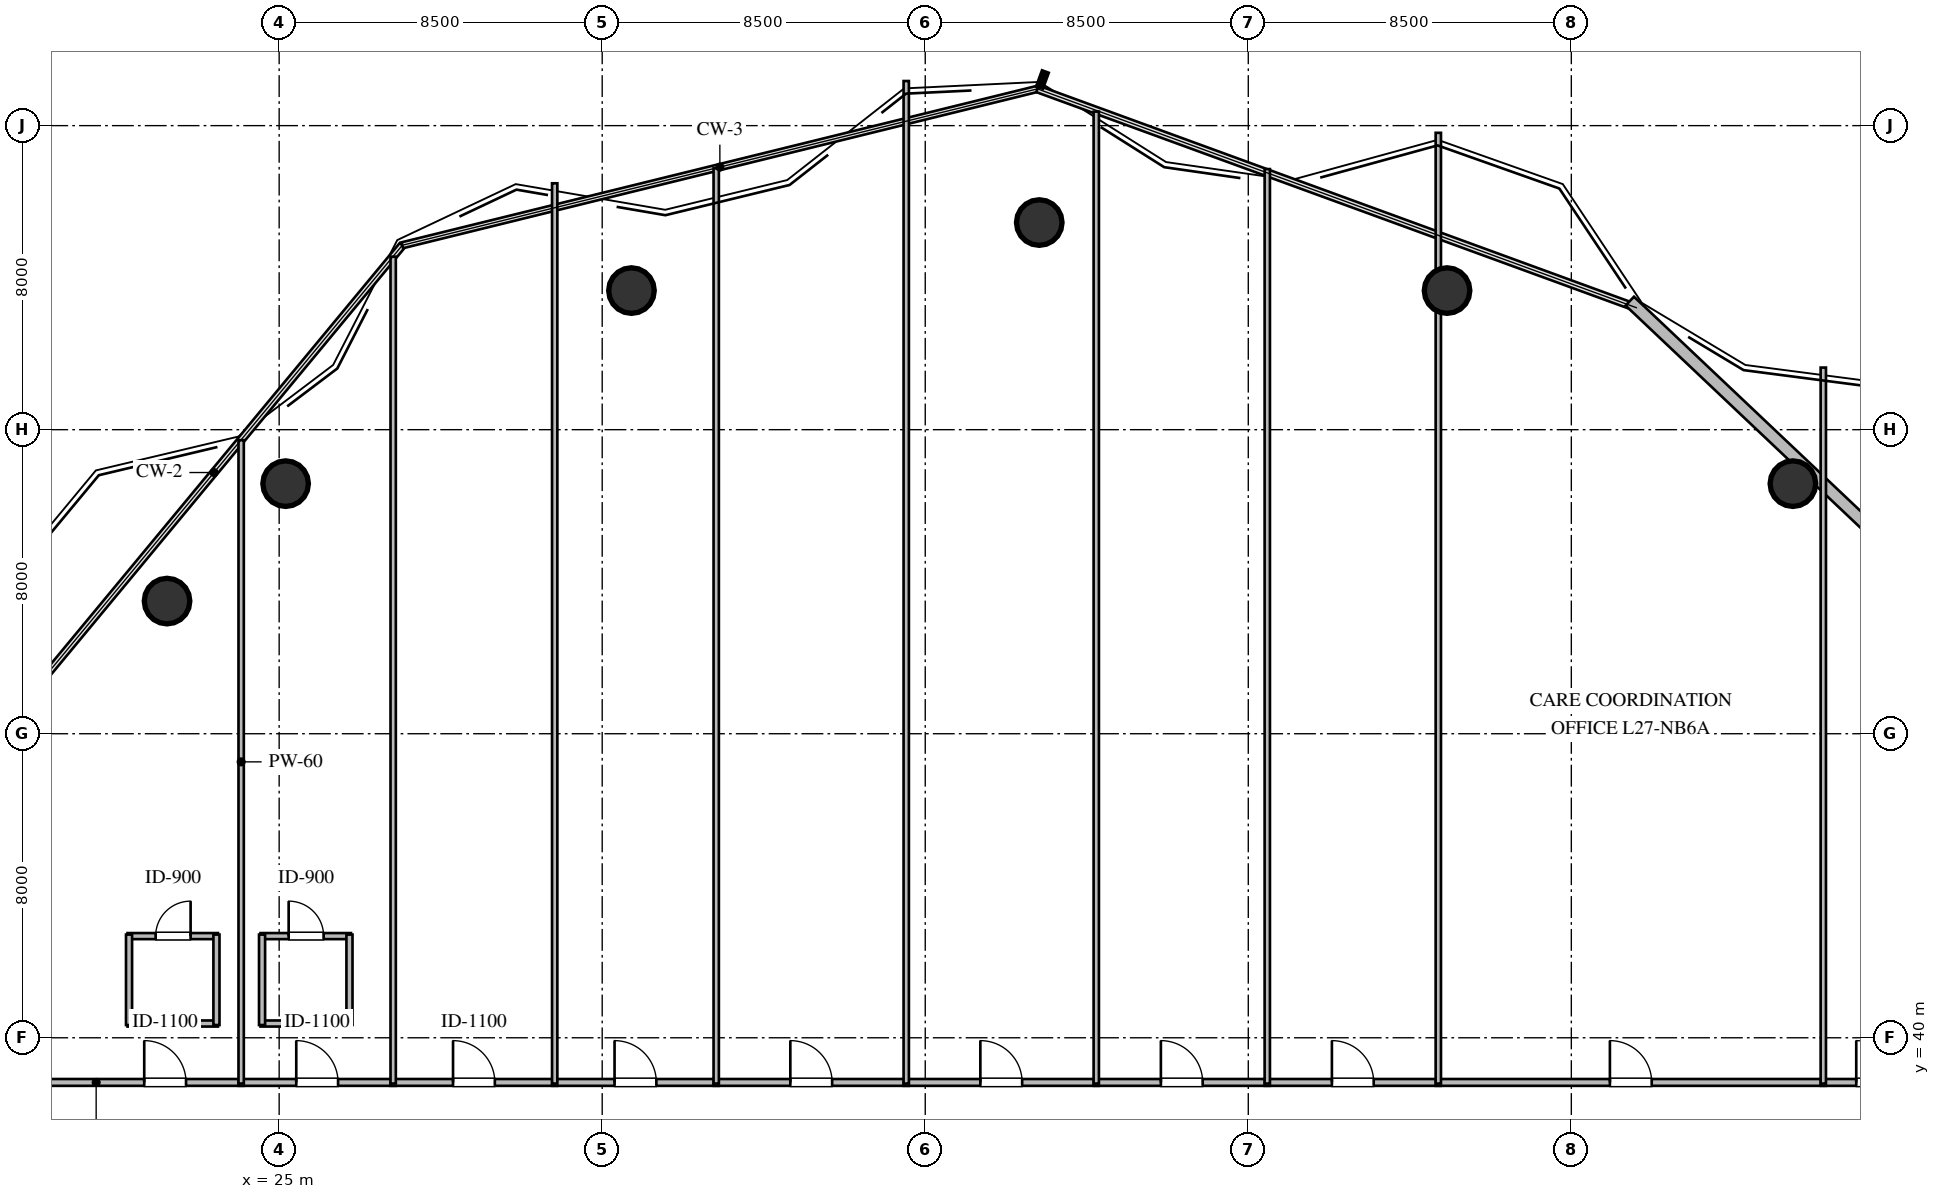
"""IFC4 building model, lengths in metres.
Left out: names, types, materials, properties, quantities, classifications, styles, units other than length and angle.
Written with IfcOpenShell. Run it as: python <this file> out.ifc"""

import sys

from ifc_helpers import new_model, si_unit, direction, frame, frame_2d, origin, origin_2d, place, context, subcontext, project, spatial, rectangle, circle, extrude, element, fill, save


model = new_model("IFC4")
c1 = context("Model", 3, precision=1e-05, world=origin(), true_north=direction((0.0, 1.0)))
c2 = subcontext(c1, "Body", "Model", "MODEL_VIEW")
j1 = project(units=[si_unit("LENGTHUNIT", "METRE"), si_unit("PLANEANGLEUNIT", "RADIAN")], contexts=[c1])
p1 = place(None, origin())
s1 = spatial("IfcSite", under=j1, at=p1, CompositionType="ELEMENT")
p2 = place(p1, origin())
s2 = spatial("IfcBuilding", under=s1, at=p2, CompositionType="ELEMENT")
p3 = place(p2, frame((0.0, 0.0, 106.2)))
s3 = spatial("IfcBuildingStorey", under=s2, at=p3, CompositionType="ELEMENT", Elevation=106.2)
for number, where, z_axis, x_axis in (
    (1, (64.83, 54.58, 0.0), (0.0, 0.0, 1.0), (1.0, 0.0, 0.0)),
    (2, (55.73, 59.66, 0.0), (0.0, 0.0, 1.0), (1.0, 0.0, 0.0)),
    (3, (45.0, 61.45, 0.0), (0.0, 0.0, 1.0), (1.0, 0.0, 0.0)),
    (4, (34.27, 59.66, 0.0), (0.0, 0.0, 1.0), (1.0, 0.0, 0.0)),
    (5, (25.17, 54.58, 0.0), (0.0, 0.0, 1.0), (1.0, 0.0, 0.0)),
    (6, (22.05, 51.49, 0.0), (0.0, 0.0, 1.0), (1.0, 0.0, 0.0)),
):
    element("IfcColumn", number, at=place(p3, frame(where, z_axis=z_axis, x_axis=x_axis)), inside=s3, PredefinedType="COLUMN", context=c2, shape_type="SweptSolid", body=[
        extrude(circle(Radius=0.6, at=origin_2d()), origin(), (0.0, 0.0, 1.0), 3.6),
    ])
p4 = place(p3, frame((60.538, 59.383, 0.0), z_axis=(0.0, 0.0, 1.0), x_axis=(0.726378346584, -0.687295058628, 0.0)))
e7 = element("IfcWall", 7, at=p4, inside=s3, PredefinedType="STANDARD", context=c2, shape_type="SweptSolid", body=[
    extrude(rectangle(XDim=15.654, YDim=0.32, at=frame_2d((7.827, 0.0))), origin(), (0.0, 0.0, 1.0), 3.36),
])
p5 = place(p3, frame((21.01, 40.375, 0.0), z_axis=(0.0, 0.0, 1.0), x_axis=(1.0, 0.0, 0.0)))
e8 = element("IfcWall", 8, at=p5, inside=s3, PredefinedType="PLUMBINGWALL", context=c2, shape_type="SweptSolid", body=[
    extrude(rectangle(XDim=2.38, YDim=0.16, at=frame_2d((1.19, 0.0))), origin(), (0.0, 0.0, 1.0), 3.36),
])
p6 = place(p3, frame((21.01, 42.675, 0.0), z_axis=(0.0, 0.0, 1.0), x_axis=(1.0, 0.0, 0.0)))
e9 = element("IfcWall", 9, at=p6, inside=s3, PredefinedType="PLUMBINGWALL", context=c2, shape_type="SweptSolid", body=[
    extrude(rectangle(XDim=2.38, YDim=0.16, at=frame_2d((1.19, 0.0))), origin(), (0.0, 0.0, 1.0), 3.36),
])
p7 = place(p6, frame((0.74, 0.0, 0.0)))
e10 = element("IfcOpeningElement", 10, at=p7, cuts=e9, PredefinedType="OPENING", context=c2, shape_type="SweptSolid", body=[
    extrude(rectangle(XDim=0.92, YDim=2.1, at=frame_2d((0.46, 1.05))), frame((0.0, 0.09, 0.0), z_axis=(0.0, -1.0, 0.0), x_axis=(1.0, 0.0, 0.0)), (0.0, 0.0, 1.0), 0.18),
])
p8 = place(p3, frame((21.05, 40.335, 0.0), z_axis=(0.0, 0.0, 1.0), x_axis=(0.0, 1.0, 0.0)))
e11 = element("IfcWall", 11, at=p8, inside=s3, PredefinedType="PLUMBINGWALL", context=c2, shape_type="SweptSolid", body=[
    extrude(rectangle(XDim=2.38, YDim=0.16, at=frame_2d((1.19, 0.0))), origin(), (0.0, 0.0, 1.0), 3.36),
])
p9 = place(p3, frame((23.35, 40.335, 0.0), z_axis=(0.0, 0.0, 1.0), x_axis=(0.0, 1.0, 0.0)))
e12 = element("IfcWall", 12, at=p9, inside=s3, PredefinedType="PLUMBINGWALL", context=c2, shape_type="SweptSolid", body=[
    extrude(rectangle(XDim=2.38, YDim=0.16, at=frame_2d((1.19, 0.0))), origin(), (0.0, 0.0, 1.0), 2.89),
])
p10 = place(p3, frame((24.51, 40.375, 0.0), z_axis=(0.0, 0.0, 1.0), x_axis=(1.0, 0.0, 0.0)))
e13 = element("IfcWall", 13, at=p10, inside=s3, PredefinedType="PLUMBINGWALL", context=c2, shape_type="SweptSolid", body=[
    extrude(rectangle(XDim=2.38, YDim=0.16, at=frame_2d((1.19, 0.0))), origin(), (0.0, 0.0, 1.0), 3.36),
])
p11 = place(p3, frame((24.51, 42.675, 0.0), z_axis=(0.0, 0.0, 1.0), x_axis=(1.0, 0.0, 0.0)))
e14 = element("IfcWall", 14, at=p11, inside=s3, PredefinedType="PLUMBINGWALL", context=c2, shape_type="SweptSolid", body=[
    extrude(rectangle(XDim=2.38, YDim=0.16, at=frame_2d((1.19, 0.0))), origin(), (0.0, 0.0, 1.0), 3.36),
])
p12 = place(p11, frame((0.74, 0.0, 0.0)))
e15 = element("IfcOpeningElement", 15, at=p12, cuts=e14, PredefinedType="OPENING", context=c2, shape_type="SweptSolid", body=[
    extrude(rectangle(XDim=0.92, YDim=2.1, at=frame_2d((0.46, 1.05))), frame((0.0, 0.09, 0.0), z_axis=(0.0, -1.0, 0.0), x_axis=(1.0, 0.0, 0.0)), (0.0, 0.0, 1.0), 0.18),
])
for number, where, z_axis, x_axis in (
    (16, (24.55, 40.335, 0.0), (0.0, 0.0, 1.0), (0.0, 1.0, 0.0)),
    (17, (26.85, 40.335, 0.0), (0.0, 0.0, 1.0), (0.0, 1.0, 0.0)),
):
    element("IfcWall", number, at=place(p3, frame(where, z_axis=z_axis, x_axis=x_axis)), inside=s3, PredefinedType="PLUMBINGWALL", context=c2, shape_type="SweptSolid", body=[
        extrude(rectangle(XDim=2.38, YDim=0.16, at=frame_2d((1.19, 0.0))), origin(), (0.0, 0.0, 1.0), 3.36),
    ])
p13 = place(p3, frame((16.305, 38.825, 0.0), z_axis=(0.0, 0.0, 1.0), x_axis=(1.0, 0.0, 0.0)))
e18 = element("IfcWall", 18, at=p13, inside=s3, PredefinedType="PARTITIONING", context=c2, shape_type="SweptSolid", body=[
    extrude(rectangle(XDim=7.76, YDim=0.18, at=frame_2d((3.88, 0.0))), origin(), (0.0, 0.0, 1.0), 3.36),
])
p14 = place(p13, frame((5.145, 0.0, 0.0)))
e19 = element("IfcOpeningElement", 19, at=p14, cuts=e18, PredefinedType="OPENING", context=c2, shape_type="SweptSolid", body=[
    extrude(rectangle(XDim=1.1, YDim=2.1, at=frame_2d((0.55, 1.05))), frame((0.0, 0.1, 0.0), z_axis=(0.0, -1.0, 0.0), x_axis=(1.0, 0.0, 0.0)), (0.0, 0.0, 1.0), 0.2),
])
p15 = place(p3, frame((23.935, 38.825, 0.0), z_axis=(0.0, 0.0, 1.0), x_axis=(1.0, 0.0, 0.0)))
e20 = element("IfcWall", 20, at=p15, inside=s3, PredefinedType="PARTITIONING", context=c2, shape_type="SweptSolid", body=[
    extrude(rectangle(XDim=4.13, YDim=0.18, at=frame_2d((2.065, 0.0))), origin(), (0.0, 0.0, 1.0), 3.36),
])
p16 = place(p15, frame((1.515, 0.0, 0.0)))
e21 = element("IfcOpeningElement", 21, at=p16, cuts=e20, PredefinedType="OPENING", context=c2, shape_type="SweptSolid", body=[
    extrude(rectangle(XDim=1.1, YDim=2.1, at=frame_2d((0.55, 1.05))), frame((0.0, 0.1, 0.0), z_axis=(0.0, -1.0, 0.0), x_axis=(1.0, 0.0, 0.0)), (0.0, 0.0, 1.0), 0.2),
])
p17 = place(p3, frame((27.935, 38.825, 0.0), z_axis=(0.0, 0.0, 1.0), x_axis=(1.0, 0.0, 0.0)))
e22 = element("IfcWall", 22, at=p17, inside=s3, PredefinedType="PARTITIONING", context=c2, shape_type="SweptSolid", body=[
    extrude(rectangle(XDim=4.38, YDim=0.18, at=frame_2d((2.19, 0.0))), origin(), (0.0, 0.0, 1.0), 3.36),
])
p18 = place(p17, frame((1.64, 0.0, 0.0)))
e23 = element("IfcOpeningElement", 23, at=p18, cuts=e22, PredefinedType="OPENING", context=c2, shape_type="SweptSolid", body=[
    extrude(rectangle(XDim=1.1, YDim=2.1, at=frame_2d((0.55, 1.05))), frame((0.0, 0.1, 0.0), z_axis=(0.0, -1.0, 0.0), x_axis=(1.0, 0.0, 0.0)), (0.0, 0.0, 1.0), 0.2),
])
p19 = place(p3, frame((32.185, 38.825, 0.0), z_axis=(0.0, 0.0, 1.0), x_axis=(1.0, 0.0, 0.0)))
e24 = element("IfcWall", 24, at=p19, inside=s3, PredefinedType="PARTITIONING", context=c2, shape_type="SweptSolid", body=[
    extrude(rectangle(XDim=4.38, YDim=0.18, at=frame_2d((2.19, 0.0))), origin(), (0.0, 0.0, 1.0), 3.36),
])
p20 = place(p19, frame((1.64, 0.0, 0.0)))
e25 = element("IfcOpeningElement", 25, at=p20, cuts=e24, PredefinedType="OPENING", context=c2, shape_type="SweptSolid", body=[
    extrude(rectangle(XDim=1.1, YDim=2.1, at=frame_2d((0.55, 1.05))), frame((0.0, 0.1, 0.0), z_axis=(0.0, -1.0, 0.0), x_axis=(1.0, 0.0, 0.0)), (0.0, 0.0, 1.0), 0.2),
])
p21 = place(p3, frame((36.435, 38.825, 0.0), z_axis=(0.0, 0.0, 1.0), x_axis=(1.0, 0.0, 0.0)))
e26 = element("IfcWall", 26, at=p21, inside=s3, PredefinedType="PARTITIONING", context=c2, shape_type="SweptSolid", body=[
    extrude(rectangle(XDim=5.13, YDim=0.18, at=frame_2d((2.565, 0.0))), origin(), (0.0, 0.0, 1.0), 3.36),
])
p22 = place(p21, frame((2.015, 0.0, 0.0)))
e27 = element("IfcOpeningElement", 27, at=p22, cuts=e26, PredefinedType="OPENING", context=c2, shape_type="SweptSolid", body=[
    extrude(rectangle(XDim=1.1, YDim=2.1, at=frame_2d((0.55, 1.05))), frame((0.0, 0.1, 0.0), z_axis=(0.0, -1.0, 0.0), x_axis=(1.0, 0.0, 0.0)), (0.0, 0.0, 1.0), 0.2),
])
p23 = place(p3, frame((41.435, 38.825, 0.0), z_axis=(0.0, 0.0, 1.0), x_axis=(1.0, 0.0, 0.0)))
e28 = element("IfcWall", 28, at=p23, inside=s3, PredefinedType="PARTITIONING", context=c2, shape_type="SweptSolid", body=[
    extrude(rectangle(XDim=5.13, YDim=0.18, at=frame_2d((2.565, 0.0))), origin(), (0.0, 0.0, 1.0), 3.36),
])
p24 = place(p23, frame((2.015, 0.0, 0.0)))
e29 = element("IfcOpeningElement", 29, at=p24, cuts=e28, PredefinedType="OPENING", context=c2, shape_type="SweptSolid", body=[
    extrude(rectangle(XDim=1.1, YDim=2.1, at=frame_2d((0.55, 1.05))), frame((0.0, 0.1, 0.0), z_axis=(0.0, -1.0, 0.0), x_axis=(1.0, 0.0, 0.0)), (0.0, 0.0, 1.0), 0.2),
])
p25 = place(p3, frame((46.435, 38.825, 0.0), z_axis=(0.0, 0.0, 1.0), x_axis=(1.0, 0.0, 0.0)))
e30 = element("IfcWall", 30, at=p25, inside=s3, PredefinedType="PARTITIONING", context=c2, shape_type="SweptSolid", body=[
    extrude(rectangle(XDim=4.63, YDim=0.18, at=frame_2d((2.315, 0.0))), origin(), (0.0, 0.0, 1.0), 3.36),
])
p26 = place(p25, frame((1.765, 0.0, 0.0)))
e31 = element("IfcOpeningElement", 31, at=p26, cuts=e30, PredefinedType="OPENING", context=c2, shape_type="SweptSolid", body=[
    extrude(rectangle(XDim=1.1, YDim=2.1, at=frame_2d((0.55, 1.05))), frame((0.0, 0.1, 0.0), z_axis=(0.0, -1.0, 0.0), x_axis=(1.0, 0.0, 0.0)), (0.0, 0.0, 1.0), 0.2),
])
p27 = place(p3, frame((50.935, 38.825, 0.0), z_axis=(0.0, 0.0, 1.0), x_axis=(1.0, 0.0, 0.0)))
e32 = element("IfcWall", 32, at=p27, inside=s3, PredefinedType="PARTITIONING", context=c2, shape_type="SweptSolid", body=[
    extrude(rectangle(XDim=4.63, YDim=0.18, at=frame_2d((2.315, 0.0))), origin(), (0.0, 0.0, 1.0), 3.36),
])
p28 = place(p27, frame((1.765, 0.0, 0.0)))
e33 = element("IfcOpeningElement", 33, at=p28, cuts=e32, PredefinedType="OPENING", context=c2, shape_type="SweptSolid", body=[
    extrude(rectangle(XDim=1.1, YDim=2.1, at=frame_2d((0.55, 1.05))), frame((0.0, 0.1, 0.0), z_axis=(0.0, -1.0, 0.0), x_axis=(1.0, 0.0, 0.0)), (0.0, 0.0, 1.0), 0.2),
])
p29 = place(p3, frame((55.435, 38.825, 0.0), z_axis=(0.0, 0.0, 1.0), x_axis=(1.0, 0.0, 0.0)))
e34 = element("IfcWall", 34, at=p29, inside=s3, PredefinedType="PARTITIONING", context=c2, shape_type="SweptSolid", body=[
    extrude(rectangle(XDim=10.26, YDim=0.18, at=frame_2d((5.13, 0.0))), origin(), (0.0, 0.0, 1.0), 3.36),
])
p30 = place(p29, frame((4.58, 0.0, 0.0)))
e35 = element("IfcOpeningElement", 35, at=p30, cuts=e34, PredefinedType="OPENING", context=c2, shape_type="SweptSolid", body=[
    extrude(rectangle(XDim=1.1, YDim=2.1, at=frame_2d((0.55, 1.05))), frame((0.0, 0.1, 0.0), z_axis=(0.0, -1.0, 0.0), x_axis=(1.0, 0.0, 0.0)), (0.0, 0.0, 1.0), 0.2),
])
p31 = place(p3, frame((65.565, 38.825, 0.0), z_axis=(0.0, 0.0, 1.0), x_axis=(1.0, 0.0, 0.0)))
e36 = element("IfcWall", 36, at=p31, inside=s3, PredefinedType="PARTITIONING", context=c2, shape_type="SweptSolid", body=[
    extrude(rectangle(XDim=2.965, YDim=0.18, at=frame_2d((1.482, 0.0))), origin(), (0.0, 0.0, 1.0), 3.36),
])
p32 = place(p31, frame((0.932, 0.0, 0.0)))
e37 = element("IfcOpeningElement", 37, at=p32, cuts=e36, PredefinedType="OPENING", context=c2, shape_type="SweptSolid", body=[
    extrude(rectangle(XDim=1.1, YDim=2.1, at=frame_2d((0.55, 1.05))), frame((0.0, 0.1, 0.0), z_axis=(0.0, -1.0, 0.0), x_axis=(1.0, 0.0, 0.0)), (0.0, 0.0, 1.0), 0.2),
])
p33 = place(p3, frame((24.0, 55.724, 0.0), z_axis=(0.0, 0.0, 1.0), x_axis=(0.0, -1.0, 0.0)))
e38 = element("IfcWall", 38, at=p33, inside=s3, PredefinedType="PARTITIONING", context=c2, shape_type="SweptSolid", body=[
    extrude(rectangle(XDim=16.929, YDim=0.14, at=frame_2d((8.465, 0.0))), origin(), (0.0, 0.0, 1.0), 2.89),
])
p34 = place(p3, frame((28.0, 60.552, 0.0), z_axis=(0.0, 0.0, 1.0), x_axis=(0.0, -1.0, 0.0)))
e39 = element("IfcWall", 39, at=p34, inside=s3, PredefinedType="PARTITIONING", context=c2, shape_type="SweptSolid", body=[
    extrude(rectangle(XDim=21.757, YDim=0.14, at=frame_2d((10.879, 0.0))), origin(), (0.0, 0.0, 1.0), 3.36),
])
p35 = place(p3, frame((32.25, 62.483, 0.0), z_axis=(0.0, 0.0, 1.0), x_axis=(0.0, -1.0, 0.0)))
e40 = element("IfcWall", 40, at=p35, inside=s3, PredefinedType="PARTITIONING", context=c2, shape_type="SweptSolid", body=[
    extrude(rectangle(XDim=23.688, YDim=0.14, at=frame_2d((11.844, 0.0))), origin(), (0.0, 0.0, 1.0), 3.36),
])
p36 = place(p3, frame((36.5, 62.876, 0.0), z_axis=(0.0, 0.0, 1.0), x_axis=(0.0, -1.0, 0.0)))
e41 = element("IfcWall", 41, at=p36, inside=s3, PredefinedType="PARTITIONING", context=c2, shape_type="SweptSolid", body=[
    extrude(rectangle(XDim=24.081, YDim=0.14, at=frame_2d((12.041, 0.0))), origin(), (0.0, 0.0, 1.0), 3.36),
])
p37 = place(p3, frame((41.5, 65.174, 0.0), z_axis=(0.0, 0.0, 1.0), x_axis=(0.0, -1.0, 0.0)))
e42 = element("IfcWall", 42, at=p37, inside=s3, PredefinedType="PARTITIONING", context=c2, shape_type="SweptSolid", body=[
    extrude(rectangle(XDim=26.379, YDim=0.14, at=frame_2d((13.189, 0.0))), origin(), (0.0, 0.0, 1.0), 3.36),
])
p38 = place(p3, frame((46.5, 64.369, 0.0), z_axis=(0.0, 0.0, 1.0), x_axis=(0.0, -1.0, 0.0)))
e43 = element("IfcWall", 43, at=p38, inside=s3, PredefinedType="PARTITIONING", context=c2, shape_type="SweptSolid", body=[
    extrude(rectangle(XDim=25.574, YDim=0.14, at=frame_2d((12.787, 0.0))), origin(), (0.0, 0.0, 1.0), 3.36),
])
p39 = place(p3, frame((51.0, 62.857, 0.0), z_axis=(0.0, 0.0, 1.0), x_axis=(0.0, -1.0, 0.0)))
e44 = element("IfcWall", 44, at=p39, inside=s3, PredefinedType="PARTITIONING", context=c2, shape_type="SweptSolid", body=[
    extrude(rectangle(XDim=24.062, YDim=0.14, at=frame_2d((12.031, 0.0))), origin(), (0.0, 0.0, 1.0), 3.36),
])
p40 = place(p3, frame((55.5, 63.811, 0.0), z_axis=(0.0, 0.0, 1.0), x_axis=(0.0, -1.0, 0.0)))
e45 = element("IfcWall", 45, at=p40, inside=s3, PredefinedType="PARTITIONING", context=c2, shape_type="SweptSolid", body=[
    extrude(rectangle(XDim=25.016, YDim=0.14, at=frame_2d((12.508, 0.0))), origin(), (0.0, 0.0, 1.0), 3.36),
])
p41 = place(p3, frame((65.63, 57.634, 0.0), z_axis=(0.0, 0.0, 1.0), x_axis=(0.0, -1.0, 0.0)))
e46 = element("IfcWall", 46, at=p41, inside=s3, PredefinedType="PARTITIONING", context=c2, shape_type="SweptSolid", body=[
    extrude(rectangle(XDim=18.839, YDim=0.14, at=frame_2d((9.419, 0.0))), origin(), (0.0, 0.0, 1.0), 3.36),
])
p42 = place(p7, origin())
e47 = element("IfcDoor", 47, at=p42, inside=s3, OperationType="SINGLE_SWING_RIGHT", PredefinedType="DOOR", context=c2, shape_type="SweptSolid", body=[
    extrude(rectangle(XDim=0.92, YDim=2.1, at=frame_2d((0.46, 1.05))), frame((0.0, 0.025, 0.0), z_axis=(0.0, -1.0, 0.0), x_axis=(1.0, 0.0, 0.0)), (0.0, 0.0, 1.0), 0.05),
])
fill(e10, e47)
p43 = place(p12, origin())
e48 = element("IfcDoor", 48, at=p43, inside=s3, OperationType="SINGLE_SWING_LEFT", PredefinedType="DOOR", context=c2, shape_type="SweptSolid", body=[
    extrude(rectangle(XDim=0.92, YDim=2.1, at=frame_2d((0.46, 1.05))), frame((0.0, 0.025, 0.0), z_axis=(0.0, -1.0, 0.0), x_axis=(1.0, 0.0, 0.0)), (0.0, 0.0, 1.0), 0.05),
])
fill(e15, e48)
p44 = place(p14, origin())
e49 = element("IfcDoor", 49, at=p44, inside=s3, OperationType="SINGLE_SWING_LEFT", PredefinedType="DOOR", context=c2, shape_type="SweptSolid", body=[
    extrude(rectangle(XDim=1.1, YDim=2.1, at=frame_2d((0.55, 1.05))), frame((0.0, 0.025, 0.0), z_axis=(0.0, -1.0, 0.0), x_axis=(1.0, 0.0, 0.0)), (0.0, 0.0, 1.0), 0.05),
])
fill(e19, e49)
p45 = place(p16, origin())
e50 = element("IfcDoor", 50, at=p45, inside=s3, OperationType="SINGLE_SWING_LEFT", PredefinedType="DOOR", context=c2, shape_type="SweptSolid", body=[
    extrude(rectangle(XDim=1.1, YDim=2.1, at=frame_2d((0.55, 1.05))), frame((0.0, 0.025, 0.0), z_axis=(0.0, -1.0, 0.0), x_axis=(1.0, 0.0, 0.0)), (0.0, 0.0, 1.0), 0.05),
])
fill(e21, e50)
p46 = place(p18, origin())
e51 = element("IfcDoor", 51, at=p46, inside=s3, OperationType="SINGLE_SWING_LEFT", PredefinedType="DOOR", context=c2, shape_type="SweptSolid", body=[
    extrude(rectangle(XDim=1.1, YDim=2.1, at=frame_2d((0.55, 1.05))), frame((0.0, 0.025, 0.0), z_axis=(0.0, -1.0, 0.0), x_axis=(1.0, 0.0, 0.0)), (0.0, 0.0, 1.0), 0.05),
])
fill(e23, e51)
p47 = place(p20, origin())
e52 = element("IfcDoor", 52, at=p47, inside=s3, OperationType="SINGLE_SWING_LEFT", PredefinedType="DOOR", context=c2, shape_type="SweptSolid", body=[
    extrude(rectangle(XDim=1.1, YDim=2.1, at=frame_2d((0.55, 1.05))), frame((0.0, 0.025, 0.0), z_axis=(0.0, -1.0, 0.0), x_axis=(1.0, 0.0, 0.0)), (0.0, 0.0, 1.0), 0.05),
])
fill(e25, e52)
p48 = place(p22, origin())
e53 = element("IfcDoor", 53, at=p48, inside=s3, OperationType="SINGLE_SWING_LEFT", PredefinedType="DOOR", context=c2, shape_type="SweptSolid", body=[
    extrude(rectangle(XDim=1.1, YDim=2.1, at=frame_2d((0.55, 1.05))), frame((0.0, 0.025, 0.0), z_axis=(0.0, -1.0, 0.0), x_axis=(1.0, 0.0, 0.0)), (0.0, 0.0, 1.0), 0.05),
])
fill(e27, e53)
p49 = place(p24, origin())
e54 = element("IfcDoor", 54, at=p49, inside=s3, OperationType="SINGLE_SWING_LEFT", PredefinedType="DOOR", context=c2, shape_type="SweptSolid", body=[
    extrude(rectangle(XDim=1.1, YDim=2.1, at=frame_2d((0.55, 1.05))), frame((0.0, 0.025, 0.0), z_axis=(0.0, -1.0, 0.0), x_axis=(1.0, 0.0, 0.0)), (0.0, 0.0, 1.0), 0.05),
])
fill(e29, e54)
p50 = place(p26, origin())
e55 = element("IfcDoor", 55, at=p50, inside=s3, OperationType="SINGLE_SWING_LEFT", PredefinedType="DOOR", context=c2, shape_type="SweptSolid", body=[
    extrude(rectangle(XDim=1.1, YDim=2.1, at=frame_2d((0.55, 1.05))), frame((0.0, 0.025, 0.0), z_axis=(0.0, -1.0, 0.0), x_axis=(1.0, 0.0, 0.0)), (0.0, 0.0, 1.0), 0.05),
])
fill(e31, e55)
p51 = place(p28, origin())
e56 = element("IfcDoor", 56, at=p51, inside=s3, OperationType="SINGLE_SWING_LEFT", PredefinedType="DOOR", context=c2, shape_type="SweptSolid", body=[
    extrude(rectangle(XDim=1.1, YDim=2.1, at=frame_2d((0.55, 1.05))), frame((0.0, 0.025, 0.0), z_axis=(0.0, -1.0, 0.0), x_axis=(1.0, 0.0, 0.0)), (0.0, 0.0, 1.0), 0.05),
])
fill(e33, e56)
p52 = place(p30, origin())
e57 = element("IfcDoor", 57, at=p52, inside=s3, OperationType="SINGLE_SWING_LEFT", PredefinedType="DOOR", context=c2, shape_type="SweptSolid", body=[
    extrude(rectangle(XDim=1.1, YDim=2.1, at=frame_2d((0.55, 1.05))), frame((0.0, 0.025, 0.0), z_axis=(0.0, -1.0, 0.0), x_axis=(1.0, 0.0, 0.0)), (0.0, 0.0, 1.0), 0.05),
])
fill(e35, e57)
p53 = place(p32, origin())
e58 = element("IfcDoor", 58, at=p53, inside=s3, OperationType="SINGLE_SWING_LEFT", PredefinedType="DOOR", context=c2, shape_type="SweptSolid", body=[
    extrude(rectangle(XDim=1.1, YDim=2.1, at=frame_2d((0.55, 1.05))), frame((0.0, 0.025, 0.0), z_axis=(0.0, -1.0, 0.0), x_axis=(1.0, 0.0, 0.0)), (0.0, 0.0, 1.0), 0.05),
])
fill(e37, e58)
save(model, sys.argv[1])
